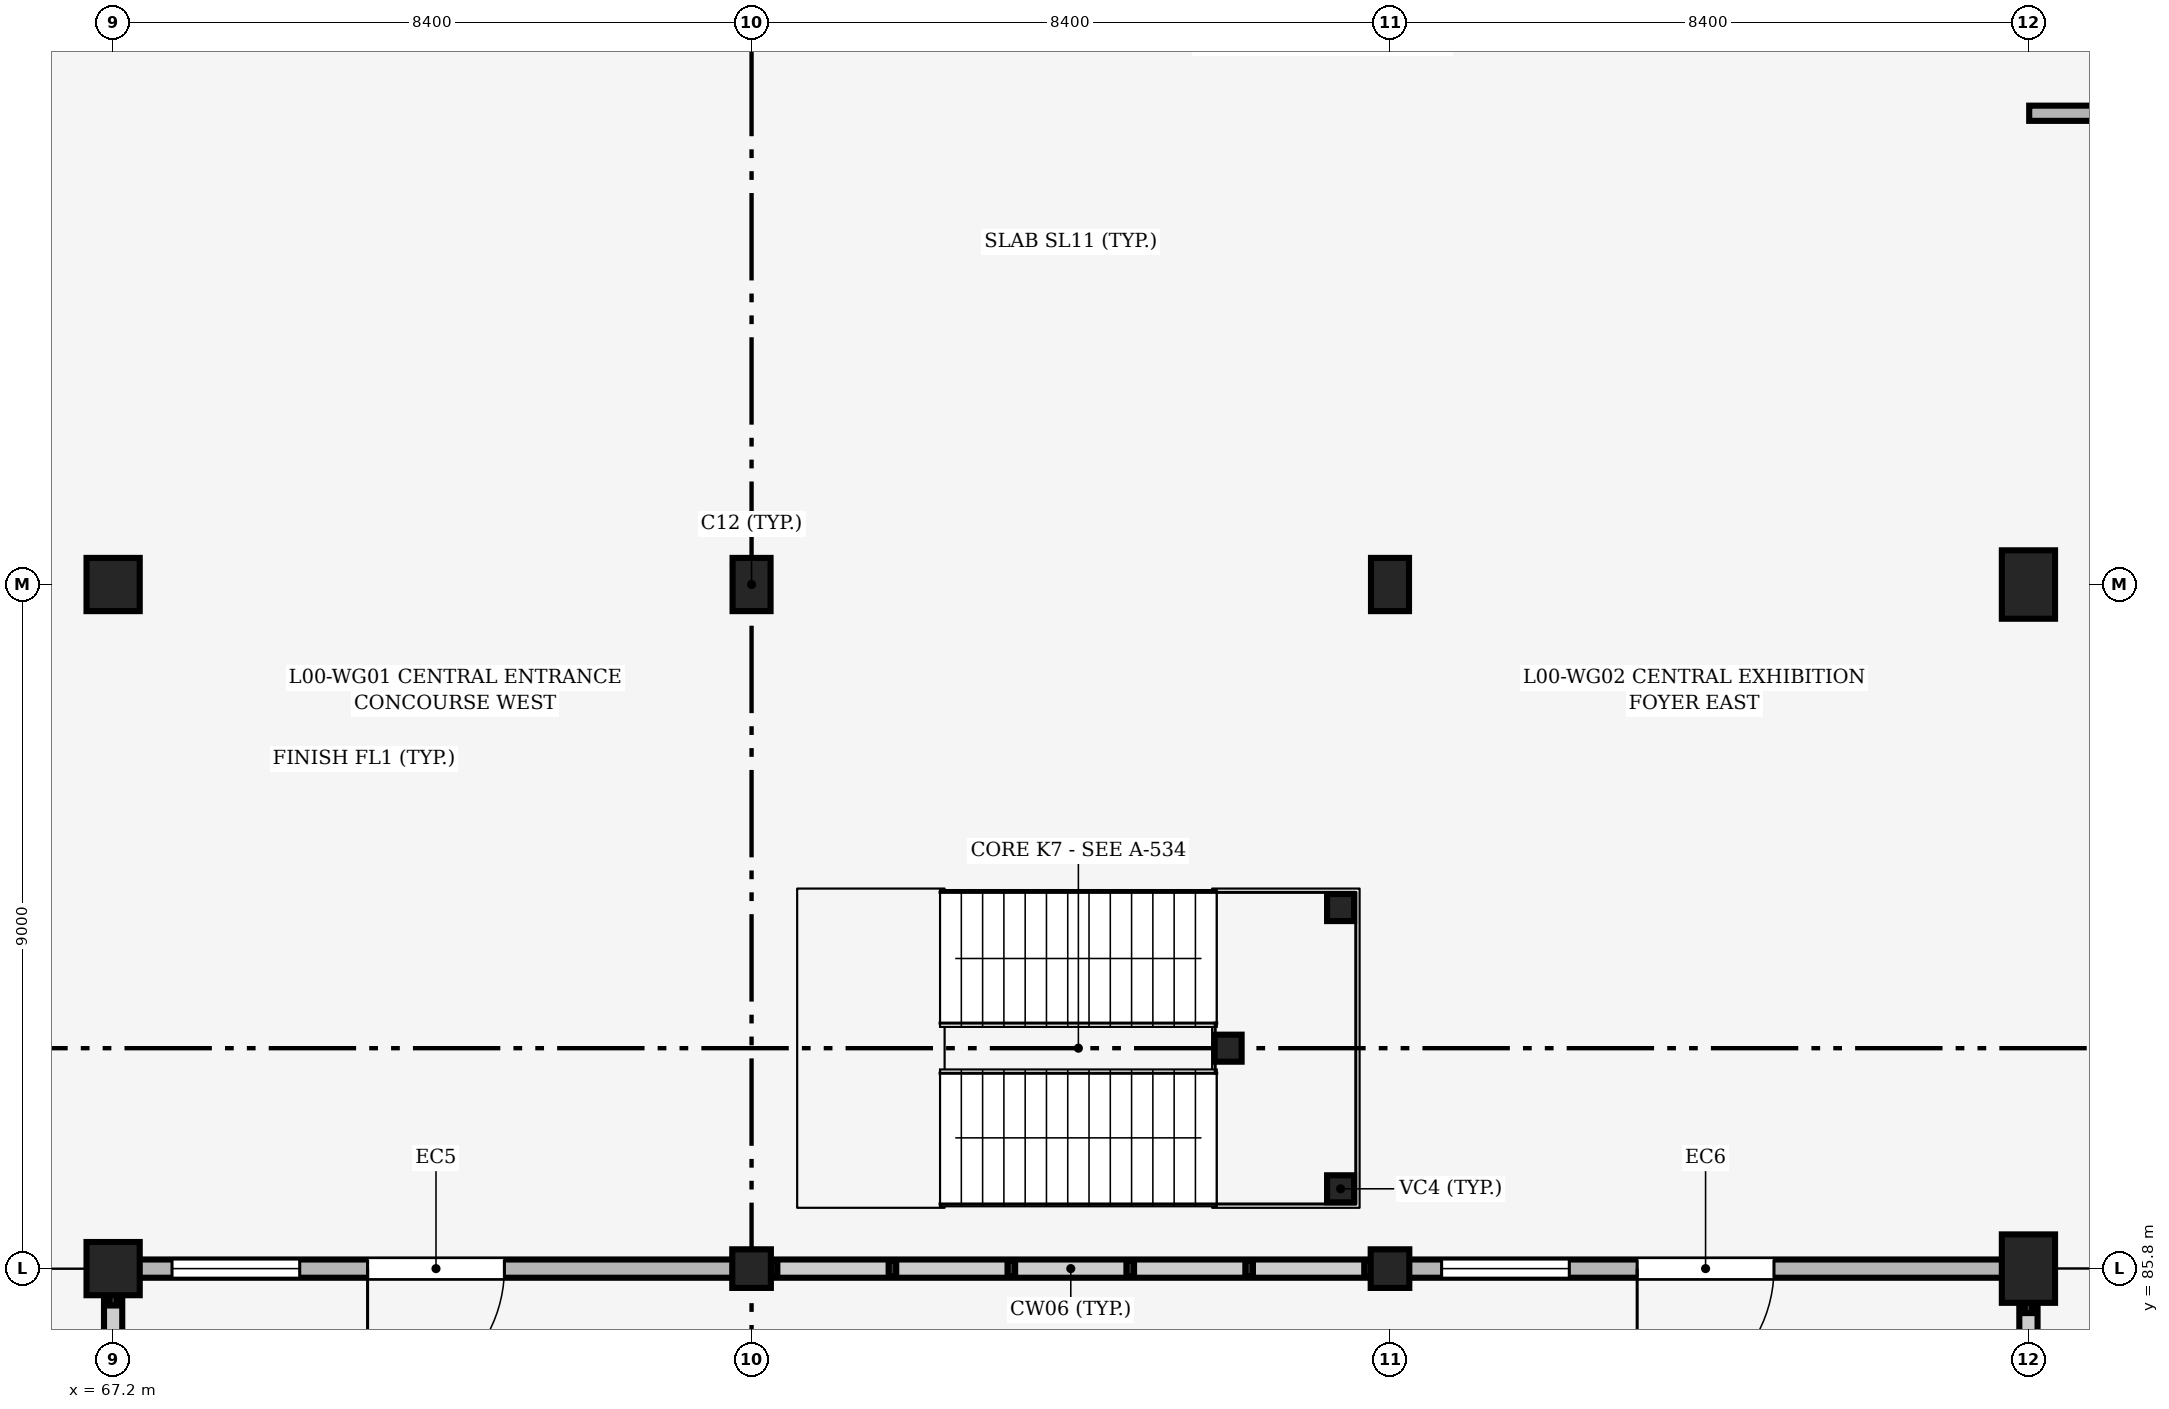
"""IFC4 building model, lengths in metres.
Left out: names, types, materials, properties, quantities, classifications, styles, units other than length and angle.
Written with IfcOpenShell. Run it as: python <this file> out.ifc"""

import sys

from ifc_helpers import new_model, si_unit, direction, frame, frame_2d, origin, origin_2d, place, context, subcontext, project, spatial, rectangle, hollow_circle, extrude, element, fill, save


model = new_model("IFC4")
c1 = context("Model", 3, precision=1e-05, world=origin(), true_north=direction((0.0, 1.0)))
c2 = subcontext(c1, "Body", "Model", "MODEL_VIEW")
j1 = project(units=[si_unit("LENGTHUNIT", "METRE"), si_unit("PLANEANGLEUNIT", "RADIAN")], contexts=[c1])
p1 = place(None, origin())
s1 = spatial("IfcSite", under=j1, at=p1, CompositionType="ELEMENT")
p2 = place(p1, origin())
s2 = spatial("IfcBuilding", under=s1, at=p2, CompositionType="ELEMENT")
p3 = place(p2, origin())
s3 = spatial("IfcBuildingStorey", under=s2, at=p3, CompositionType="ELEMENT", Elevation=0.0)
for number, where, z_axis, x_axis in (
    (1, (67.2, 85.8, 0.0), (0.0, 0.0, 1.0), (1.0, 0.0, 0.0)),
    (2, (67.2, 94.8, 0.0), (0.0, 0.0, 1.0), (1.0, 0.0, 0.0)),
):
    element("IfcColumn", number, at=place(p3, frame(where, z_axis=z_axis, x_axis=x_axis)), inside=s3, PredefinedType="COLUMN", context=c2, shape_type="SweptSolid", body=[
        extrude(rectangle(XDim=0.7, YDim=0.7, at=origin_2d()), origin(), (0.0, 0.0, 1.0), 4.8),
    ])
for number, where, z_axis, x_axis in (
    (3, (75.6, 94.8, 0.0), (0.0, 0.0, 1.0), (1.0, 0.0, 0.0)),
    (4, (84.0, 94.8, 0.0), (0.0, 0.0, 1.0), (1.0, 0.0, 0.0)),
):
    element("IfcColumn", number, at=place(p3, frame(where, z_axis=z_axis, x_axis=x_axis)), inside=s3, PredefinedType="COLUMN", context=c2, shape_type="SweptSolid", body=[
        extrude(rectangle(XDim=0.5, YDim=0.7, at=origin_2d()), origin(), (0.0, 0.0, 1.0), 4.8),
    ])
for number, where, z_axis, x_axis in (
    (5, (92.4, 85.8, 0.0), (0.0, 0.0, 1.0), (1.0, 0.0, 0.0)),
    (6, (92.4, 94.8, 0.0), (0.0, 0.0, 1.0), (1.0, 0.0, 0.0)),
):
    element("IfcColumn", number, at=place(p3, frame(where, z_axis=z_axis, x_axis=x_axis)), inside=s3, PredefinedType="COLUMN", context=c2, shape_type="SweptSolid", body=[
        extrude(rectangle(XDim=0.7, YDim=0.9, at=origin_2d()), origin(), (0.0, 0.0, 1.0), 4.8),
    ])
for number, where, z_axis, x_axis in (
    (7, (75.6, 85.8, 0.0), (0.0, 0.0, 1.0), (1.0, 0.0, 0.0)),
    (8, (84.0, 85.8, 0.0), (0.0, 0.0, 1.0), (1.0, 0.0, 0.0)),
):
    element("IfcColumn", number, at=place(p3, frame(where, z_axis=z_axis, x_axis=x_axis)), inside=s3, PredefinedType="USERDEFINED", context=c2, shape_type="SweptSolid", body=[
        extrude(hollow_circle(Radius=0.254, WallThickness=0.013, at=origin_2d()), origin(), (0.0, 0.0, 1.0), 4.8),
    ])
p4 = place(p3, frame((67.2, 77.725, 0.0), z_axis=(0.0, 0.0, 1.0), x_axis=(0.0, 1.0, 0.0)))
e9 = element("IfcWall", 9, at=p4, inside=s3, PredefinedType="SOLIDWALL", context=c2, shape_type="SweptSolid", body=[
    extrude(rectangle(XDim=7.75, YDim=0.24, at=frame_2d((3.875, 0.0))), origin(), (0.0, 0.0, 1.0), 1.15),
])
p5 = place(p3, frame((67.525, 85.8, 0.0), z_axis=(0.0, 0.0, 1.0), x_axis=(1.0, 0.0, 0.0)))
e10 = element("IfcWall", 10, at=p5, inside=s3, PredefinedType="SOLIDWALL", context=c2, shape_type="SweptSolid", body=[
    extrude(rectangle(XDim=7.846, YDim=0.24, at=frame_2d((3.923, 0.0))), origin(), (0.0, 0.0, 1.0), 3.57),
])
p6 = place(p5, frame((4.823, 0.0, 0.0), z_axis=(0.0, 0.0, 1.0), x_axis=(-1.0, 0.0, 0.0)))
e11 = element("IfcOpeningElement", 11, at=p6, cuts=e10, PredefinedType="OPENING", context=c2, shape_type="SweptSolid", body=[
    extrude(rectangle(XDim=1.8, YDim=2.35, at=frame_2d((0.9, 1.175))), frame((0.0, 0.13, 0.0), z_axis=(0.0, -1.0, 0.0), x_axis=(1.0, 0.0, 0.0)), (0.0, 0.0, 1.0), 0.26),
])
p7 = place(p5, frame((0.45, 0.0, 0.95)))
e12 = element("IfcOpeningElement", 12, at=p7, cuts=e10, PredefinedType="OPENING", context=c2, shape_type="SweptSolid", body=[
    extrude(rectangle(XDim=1.68, YDim=1.8, at=frame_2d((0.84, 0.9))), frame((0.0, 0.13, 0.0), z_axis=(0.0, -1.0, 0.0), x_axis=(1.0, 0.0, 0.0)), (0.0, 0.0, 1.0), 0.26),
])
p8 = place(p3, frame((75.829, 85.8, 0.0), z_axis=(0.0, 0.0, 1.0), x_axis=(1.0, 0.0, 0.0)))
e13 = element("IfcWall", 13, at=p8, inside=s3, PredefinedType="SOLIDWALL", context=c2, shape_type="SweptSolid", body=[
    extrude(rectangle(XDim=7.942, YDim=0.24, at=frame_2d((3.971, 0.0))), origin(), (0.0, 0.0, 1.0), 1.1),
])
p9 = place(p3, frame((84.229, 85.8, 0.0), z_axis=(0.0, 0.0, 1.0), x_axis=(1.0, 0.0, 0.0)))
e14 = element("IfcWall", 14, at=p9, inside=s3, PredefinedType="SOLIDWALL", context=c2, shape_type="SweptSolid", body=[
    extrude(rectangle(XDim=7.846, YDim=0.24, at=frame_2d((3.923, 0.0))), origin(), (0.0, 0.0, 1.0), 3.52),
])
p10 = place(p9, frame((4.823, 0.0, 0.0), z_axis=(0.0, 0.0, 1.0), x_axis=(-1.0, 0.0, 0.0)))
e15 = element("IfcOpeningElement", 15, at=p10, cuts=e14, PredefinedType="OPENING", context=c2, shape_type="SweptSolid", body=[
    extrude(rectangle(XDim=1.8, YDim=2.35, at=frame_2d((0.9, 1.175))), frame((0.0, 0.13, 0.0), z_axis=(0.0, -1.0, 0.0), x_axis=(1.0, 0.0, 0.0)), (0.0, 0.0, 1.0), 0.26),
])
p11 = place(p9, frame((0.45, 0.0, 0.95)))
e16 = element("IfcOpeningElement", 16, at=p11, cuts=e14, PredefinedType="OPENING", context=c2, shape_type="SweptSolid", body=[
    extrude(rectangle(XDim=1.68, YDim=1.8, at=frame_2d((0.84, 0.9))), frame((0.0, 0.13, 0.0), z_axis=(0.0, -1.0, 0.0), x_axis=(1.0, 0.0, 0.0)), (0.0, 0.0, 1.0), 0.26),
])
p12 = place(p3, frame((92.4, 77.825, 0.0), z_axis=(0.0, 0.0, 1.0), x_axis=(0.0, 1.0, 0.0)))
e17 = element("IfcWall", 17, at=p12, inside=s3, PredefinedType="SOLIDWALL", context=c2, shape_type="SweptSolid", body=[
    extrude(rectangle(XDim=7.55, YDim=0.24, at=frame_2d((3.775, 0.0))), origin(), (0.0, 0.0, 1.0), 1.15),
])
for number, where, z_axis, x_axis in (
    (18, (83.35, 86.85, 0.0), (0.0, 0.0, 1.0), (1.0, 0.0, 0.0)),
    (19, (83.35, 90.55, 0.0), (0.0, 0.0, 1.0), (1.0, 0.0, 0.0)),
    (20, (81.87, 88.7, 0.0), (0.0, 0.0, 1.0), (1.0, 0.0, 0.0)),
):
    element("IfcColumn", number, at=place(p3, frame(where, z_axis=z_axis, x_axis=x_axis)), inside=s3, PredefinedType="USERDEFINED", context=c2, shape_type="SweptSolid", body=[
        extrude(hollow_circle(Radius=0.178, WallThickness=0.013, at=origin_2d()), origin(), (0.0, 0.0, 1.0), 2.235),
    ])
p13 = place(p3, frame((92.41, 101.0, 0.0), z_axis=(0.0, 0.0, 1.0), x_axis=(1.0, 0.0, 0.0)))
e21 = element("IfcWall", 21, at=p13, inside=s3, PredefinedType="PARTITIONING", context=c2, shape_type="SweptSolid", body=[
    extrude(rectangle(XDim=24.995, YDim=0.2, at=frame_2d((12.498, 0.0))), origin(), (0.0, 0.0, 1.0), 4.04),
])
p14 = place(p13, frame((3.74, 0.0, 0.0)))
e22 = element("IfcOpeningElement", 22, at=p14, cuts=e21, PredefinedType="OPENING", context=c2, shape_type="SweptSolid", body=[
    extrude(rectangle(XDim=0.9, YDim=2.1, at=frame_2d((0.45, 1.05))), frame((0.0, 0.11, 0.0), z_axis=(0.0, -1.0, 0.0), x_axis=(1.0, 0.0, 0.0)), (0.0, 0.0, 1.0), 0.22),
])
p15 = place(p13, frame((12.14, 0.0, 0.0)))
e23 = element("IfcOpeningElement", 23, at=p15, cuts=e21, PredefinedType="OPENING", context=c2, shape_type="SweptSolid", body=[
    extrude(rectangle(XDim=0.9, YDim=2.1, at=frame_2d((0.45, 1.05))), frame((0.0, 0.11, 0.0), z_axis=(0.0, -1.0, 0.0), x_axis=(1.0, 0.0, 0.0)), (0.0, 0.0, 1.0), 0.22),
])
p16 = place(p13, frame((17.54, 0.0, 0.0)))
e24 = element("IfcOpeningElement", 24, at=p16, cuts=e21, PredefinedType="OPENING", context=c2, shape_type="SweptSolid", body=[
    extrude(rectangle(XDim=0.9, YDim=2.1, at=frame_2d((0.45, 1.05))), frame((0.0, 0.11, 0.0), z_axis=(0.0, -1.0, 0.0), x_axis=(1.0, 0.0, 0.0)), (0.0, 0.0, 1.0), 0.22),
])
p17 = place(p6, origin())
e25 = element("IfcDoor", 25, at=p17, inside=s3, OperationType="DOUBLE_DOOR_SINGLE_SWING", PredefinedType="DOOR", context=c2, shape_type="SweptSolid", body=[
    extrude(rectangle(XDim=1.8, YDim=2.35, at=frame_2d((0.9, 1.175))), frame((0.0, 0.025, 0.0), z_axis=(0.0, -1.0, 0.0), x_axis=(1.0, 0.0, 0.0)), (0.0, 0.0, 1.0), 0.05),
])
fill(e11, e25)
p18 = place(p7, origin())
e26 = element("IfcWindow", 26, at=p18, inside=s3, PartitioningType="SINGLE_PANEL", PredefinedType="WINDOW", context=c2, shape_type="SweptSolid", body=[
    extrude(rectangle(XDim=1.68, YDim=1.8, at=frame_2d((0.84, 0.9))), frame((0.0, 0.03, 0.0), z_axis=(0.0, -1.0, 0.0), x_axis=(1.0, 0.0, 0.0)), (0.0, 0.0, 1.0), 0.06),
])
fill(e12, e26)
p19 = place(p10, origin())
e27 = element("IfcDoor", 27, at=p19, inside=s3, OperationType="DOUBLE_DOOR_SINGLE_SWING", PredefinedType="DOOR", context=c2, shape_type="SweptSolid", body=[
    extrude(rectangle(XDim=1.8, YDim=2.35, at=frame_2d((0.9, 1.175))), frame((0.0, 0.025, 0.0), z_axis=(0.0, -1.0, 0.0), x_axis=(1.0, 0.0, 0.0)), (0.0, 0.0, 1.0), 0.05),
])
fill(e15, e27)
p20 = place(p11, origin())
e28 = element("IfcWindow", 28, at=p20, inside=s3, PartitioningType="SINGLE_PANEL", PredefinedType="WINDOW", context=c2, shape_type="SweptSolid", body=[
    extrude(rectangle(XDim=1.68, YDim=1.8, at=frame_2d((0.84, 0.9))), frame((0.0, 0.03, 0.0), z_axis=(0.0, -1.0, 0.0), x_axis=(1.0, 0.0, 0.0)), (0.0, 0.0, 1.0), 0.06),
])
fill(e16, e28)
save(model, sys.argv[1])
